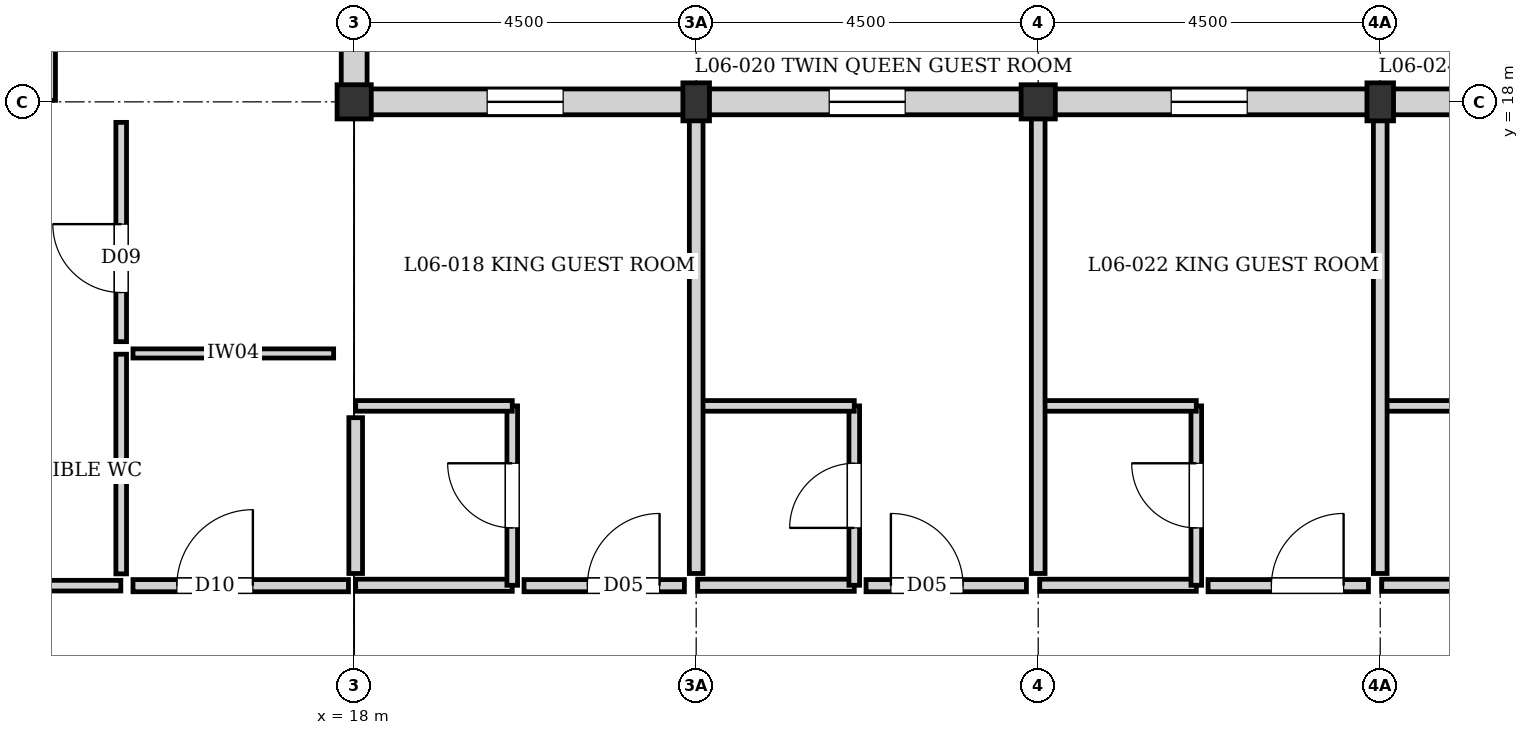
"""IFC4 building model, lengths in metres.
Left out: names, types, materials, properties, quantities, classifications, styles, units other than length and angle.
Written with IfcOpenShell. Run it as: python <this file> out.ifc"""

import sys

from ifc_helpers import new_model, si_unit, direction, frame, frame_2d, origin, origin_2d, place, context, subcontext, project, spatial, rectangle, extrude, element, fill, save


model = new_model("IFC4")
c1 = context("Model", 3, precision=1e-05, world=origin(), true_north=direction((0.0, 1.0)))
c2 = subcontext(c1, "Body", "Model", "MODEL_VIEW")
j1 = project(units=[si_unit("LENGTHUNIT", "METRE"), si_unit("PLANEANGLEUNIT", "RADIAN")], contexts=[c1])
p1 = place(None, origin())
s1 = spatial("IfcSite", under=j1, at=p1, CompositionType="ELEMENT")
p2 = place(p1, origin())
s2 = spatial("IfcBuilding", under=s1, at=p2, CompositionType="ELEMENT")
p3 = place(p2, frame((0.0, 0.0, 20.64)))
s3 = spatial("IfcBuildingStorey", under=s2, at=p3, CompositionType="ELEMENT", Elevation=20.64)
for number, where, z_axis, x_axis in (
    (1, (18.0, 18.0, 0.0), (0.0, 0.0, 1.0), (1.0, 0.0, 0.0)),
    (2, (27.0, 18.0, 0.0), (0.0, 0.0, 1.0), (1.0, 0.0, 0.0)),
):
    element("IfcColumn", number, at=place(p3, frame(where, z_axis=z_axis, x_axis=x_axis)), inside=s3, PredefinedType="COLUMN", context=c2, shape_type="SweptSolid", body=[
        extrude(rectangle(XDim=0.45, YDim=0.45, at=origin_2d()), origin(), (0.0, 0.0, 1.0), 3.04),
    ])
for number, where, z_axis, x_axis in (
    (3, (22.5, 18.0, 0.0), (0.0, 0.0, 1.0), (1.0, 0.0, 0.0)),
    (4, (31.5, 18.0, 0.0), (0.0, 0.0, 1.0), (1.0, 0.0, 0.0)),
):
    element("IfcColumn", number, at=place(p3, frame(where, z_axis=z_axis, x_axis=x_axis)), inside=s3, PredefinedType="PILASTER", context=c2, shape_type="SweptSolid", body=[
        extrude(rectangle(XDim=0.35, YDim=0.5, at=origin_2d()), origin(), (0.0, 0.0, 1.0), 3.04),
    ])
p4 = place(p3, frame((18.0, 27.0, 0.0), z_axis=(0.0, 0.0, 1.0), x_axis=(0.0, -1.0, 0.0)))
e5 = element("IfcWall", 5, at=p4, inside=s3, PredefinedType="SOLIDWALL", context=c2, shape_type="SweptSolid", body=[
    extrude(rectangle(XDim=8.845, YDim=0.34, at=frame_2d((4.422, 0.0))), origin(), (0.0, 0.0, 1.0), 2.38),
])
p5 = place(p4, frame((1.75, 0.0, 0.35)))
e6 = element("IfcOpeningElement", 6, at=p5, cuts=e5, PredefinedType="OPENING", context=c2, shape_type="SweptSolid", body=[
    extrude(rectangle(XDim=1.0, YDim=1.6, at=frame_2d((0.5, 0.8))), frame((0.0, 0.18, 0.0), z_axis=(0.0, -1.0, 0.0), x_axis=(1.0, 0.0, 0.0)), (0.0, 0.0, 1.0), 0.36),
])
p6 = place(p4, frame((6.25, 0.0, 0.35)))
e7 = element("IfcOpeningElement", 7, at=p6, cuts=e5, PredefinedType="OPENING", context=c2, shape_type="SweptSolid", body=[
    extrude(rectangle(XDim=1.0, YDim=1.6, at=frame_2d((0.5, 0.8))), frame((0.0, 0.18, 0.0), z_axis=(0.0, -1.0, 0.0), x_axis=(1.0, 0.0, 0.0)), (0.0, 0.0, 1.0), 0.36),
])
p7 = place(p3, frame((18.0, 18.0, 0.0), z_axis=(0.0, 0.0, 1.0), x_axis=(1.0, 0.0, 0.0)))
e8 = element("IfcWall", 8, at=p7, inside=s3, PredefinedType="SOLIDWALL", context=c2, shape_type="SweptSolid", body=[
    extrude(rectangle(XDim=9.0, YDim=0.34, at=frame_2d((4.5, 0.0))), origin(), (0.0, 0.0, 1.0), 2.42),
])
p8 = place(p7, frame((1.75, 0.0, 0.35)))
e9 = element("IfcOpeningElement", 9, at=p8, cuts=e8, PredefinedType="OPENING", context=c2, shape_type="SweptSolid", body=[
    extrude(rectangle(XDim=1.0, YDim=1.6, at=frame_2d((0.5, 0.8))), frame((0.0, 0.18, 0.0), z_axis=(0.0, -1.0, 0.0), x_axis=(1.0, 0.0, 0.0)), (0.0, 0.0, 1.0), 0.36),
])
p9 = place(p7, frame((6.25, 0.0, 0.35)))
e10 = element("IfcOpeningElement", 10, at=p9, cuts=e8, PredefinedType="OPENING", context=c2, shape_type="SweptSolid", body=[
    extrude(rectangle(XDim=1.0, YDim=1.6, at=frame_2d((0.5, 0.8))), frame((0.0, 0.18, 0.0), z_axis=(0.0, -1.0, 0.0), x_axis=(1.0, 0.0, 0.0)), (0.0, 0.0, 1.0), 0.36),
])
p10 = place(p3, frame((27.0, 18.0, 0.0), z_axis=(0.0, 0.0, 1.0), x_axis=(1.0, 0.0, 0.0)))
e11 = element("IfcWall", 11, at=p10, inside=s3, PredefinedType="SOLIDWALL", context=c2, shape_type="SweptSolid", body=[
    extrude(rectangle(XDim=9.0, YDim=0.34, at=frame_2d((4.5, 0.0))), origin(), (0.0, 0.0, 1.0), 2.38),
])
p11 = place(p10, frame((1.75, 0.0, 0.35)))
e12 = element("IfcOpeningElement", 12, at=p11, cuts=e11, PredefinedType="OPENING", context=c2, shape_type="SweptSolid", body=[
    extrude(rectangle(XDim=1.0, YDim=1.6, at=frame_2d((0.5, 0.8))), frame((0.0, 0.18, 0.0), z_axis=(0.0, -1.0, 0.0), x_axis=(1.0, 0.0, 0.0)), (0.0, 0.0, 1.0), 0.36),
])
p12 = place(p10, frame((6.25, 0.0, 0.35)))
e13 = element("IfcOpeningElement", 13, at=p12, cuts=e11, PredefinedType="OPENING", context=c2, shape_type="SweptSolid", body=[
    extrude(rectangle(XDim=1.0, YDim=1.6, at=frame_2d((0.5, 0.8))), frame((0.0, 0.18, 0.0), z_axis=(0.0, -1.0, 0.0), x_axis=(1.0, 0.0, 0.0)), (0.0, 0.0, 1.0), 0.36),
])
p13 = place(p3, frame((18.02, 11.64, 0.0), z_axis=(0.0, 0.0, 1.0), x_axis=(1.0, 0.0, 0.0)))
e14 = element("IfcWall", 14, at=p13, inside=s3, PredefinedType="PARTITIONING", context=c2, shape_type="SweptSolid", body=[
    extrude(rectangle(XDim=2.06, YDim=0.16, at=frame_2d((1.03, 0.0))), origin(), (0.0, 0.0, 1.0), 2.82),
])
p14 = place(p3, frame((20.08, 11.64, 0.0), z_axis=(0.0, 0.0, 1.0), x_axis=(0.0, 1.0, 0.0)))
e15 = element("IfcWall", 15, at=p14, inside=s3, PredefinedType="PLUMBINGWALL", context=c2, shape_type="SweptSolid", body=[
    extrude(rectangle(XDim=2.36, YDim=0.14, at=frame_2d((1.18, 0.0))), origin(), (0.0, 0.0, 1.0), 2.82),
])
p15 = place(p14, frame((0.755, 0.0, 0.0)))
e16 = element("IfcOpeningElement", 16, at=p15, cuts=e15, PredefinedType="OPENING", context=c2, shape_type="SweptSolid", body=[
    extrude(rectangle(XDim=0.85, YDim=2.04, at=frame_2d((0.425, 1.02))), frame((0.0, 0.08, 0.0), z_axis=(0.0, -1.0, 0.0), x_axis=(1.0, 0.0, 0.0)), (0.0, 0.0, 1.0), 0.16),
])
p16 = place(p3, frame((18.02, 14.0, 0.0), z_axis=(0.0, 0.0, 1.0), x_axis=(1.0, 0.0, 0.0)))
e17 = element("IfcWall", 17, at=p16, inside=s3, PredefinedType="PLUMBINGWALL", context=c2, shape_type="SweptSolid", body=[
    extrude(rectangle(XDim=2.06, YDim=0.14, at=frame_2d((1.03, 0.0))), origin(), (0.0, 0.0, 1.0), 2.82),
])
p17 = place(p3, frame((22.52, 11.64, 0.0), z_axis=(0.0, 0.0, 1.0), x_axis=(1.0, 0.0, 0.0)))
e18 = element("IfcWall", 18, at=p17, inside=s3, PredefinedType="PARTITIONING", context=c2, shape_type="SweptSolid", body=[
    extrude(rectangle(XDim=2.06, YDim=0.16, at=frame_2d((1.03, 0.0))), origin(), (0.0, 0.0, 1.0), 2.82),
])
p18 = place(p3, frame((24.58, 11.64, 0.0), z_axis=(0.0, 0.0, 1.0), x_axis=(0.0, 1.0, 0.0)))
e19 = element("IfcWall", 19, at=p18, inside=s3, PredefinedType="PLUMBINGWALL", context=c2, shape_type="SweptSolid", body=[
    extrude(rectangle(XDim=2.36, YDim=0.14, at=frame_2d((1.18, 0.0))), origin(), (0.0, 0.0, 1.0), 2.82),
])
p19 = place(p18, frame((0.755, 0.0, 0.0)))
e20 = element("IfcOpeningElement", 20, at=p19, cuts=e19, PredefinedType="OPENING", context=c2, shape_type="SweptSolid", body=[
    extrude(rectangle(XDim=0.85, YDim=2.04, at=frame_2d((0.425, 1.02))), frame((0.0, 0.08, 0.0), z_axis=(0.0, -1.0, 0.0), x_axis=(1.0, 0.0, 0.0)), (0.0, 0.0, 1.0), 0.16),
])
p20 = place(p3, frame((22.52, 14.0, 0.0), z_axis=(0.0, 0.0, 1.0), x_axis=(1.0, 0.0, 0.0)))
e21 = element("IfcWall", 21, at=p20, inside=s3, PredefinedType="PLUMBINGWALL", context=c2, shape_type="SweptSolid", body=[
    extrude(rectangle(XDim=2.06, YDim=0.14, at=frame_2d((1.03, 0.0))), origin(), (0.0, 0.0, 1.0), 2.82),
])
p21 = place(p3, frame((27.02, 11.64, 0.0), z_axis=(0.0, 0.0, 1.0), x_axis=(1.0, 0.0, 0.0)))
e22 = element("IfcWall", 22, at=p21, inside=s3, PredefinedType="PARTITIONING", context=c2, shape_type="SweptSolid", body=[
    extrude(rectangle(XDim=2.06, YDim=0.16, at=frame_2d((1.03, 0.0))), origin(), (0.0, 0.0, 1.0), 2.82),
])
p22 = place(p3, frame((29.08, 11.64, 0.0), z_axis=(0.0, 0.0, 1.0), x_axis=(0.0, 1.0, 0.0)))
e23 = element("IfcWall", 23, at=p22, inside=s3, PredefinedType="PLUMBINGWALL", context=c2, shape_type="SweptSolid", body=[
    extrude(rectangle(XDim=2.36, YDim=0.14, at=frame_2d((1.18, 0.0))), origin(), (0.0, 0.0, 1.0), 2.82),
])
p23 = place(p22, frame((0.755, 0.0, 0.0)))
e24 = element("IfcOpeningElement", 24, at=p23, cuts=e23, PredefinedType="OPENING", context=c2, shape_type="SweptSolid", body=[
    extrude(rectangle(XDim=0.85, YDim=2.04, at=frame_2d((0.425, 1.02))), frame((0.0, 0.08, 0.0), z_axis=(0.0, -1.0, 0.0), x_axis=(1.0, 0.0, 0.0)), (0.0, 0.0, 1.0), 0.16),
])
p24 = place(p3, frame((27.02, 14.0, 0.0), z_axis=(0.0, 0.0, 1.0), x_axis=(1.0, 0.0, 0.0)))
e25 = element("IfcWall", 25, at=p24, inside=s3, PredefinedType="PLUMBINGWALL", context=c2, shape_type="SweptSolid", body=[
    extrude(rectangle(XDim=2.06, YDim=0.14, at=frame_2d((1.03, 0.0))), origin(), (0.0, 0.0, 1.0), 2.82),
])
p25 = place(p3, frame((31.52, 11.64, 0.0), z_axis=(0.0, 0.0, 1.0), x_axis=(1.0, 0.0, 0.0)))
e26 = element("IfcWall", 26, at=p25, inside=s3, PredefinedType="PARTITIONING", context=c2, shape_type="SweptSolid", body=[
    extrude(rectangle(XDim=2.06, YDim=0.16, at=frame_2d((1.03, 0.0))), origin(), (0.0, 0.0, 1.0), 2.82),
])
for number, where, z_axis, x_axis in (
    (27, (31.52, 14.0, 0.0), (0.0, 0.0, 1.0), (1.0, 0.0, 0.0)),
    (28, (14.0, 18.02, 0.0), (0.0, 0.0, 1.0), (0.0, 1.0, 0.0)),
):
    element("IfcWall", number, at=place(p3, frame(where, z_axis=z_axis, x_axis=x_axis)), inside=s3, PredefinedType="PLUMBINGWALL", context=c2, shape_type="SweptSolid", body=[
        extrude(rectangle(XDim=2.06, YDim=0.14, at=frame_2d((1.03, 0.0))), origin(), (0.0, 0.0, 1.0), 2.82),
    ])
p26 = place(p3, frame((22.5, 11.795, 0.0), z_axis=(0.0, 0.0, 1.0), x_axis=(0.0, 1.0, 0.0)))
e29 = element("IfcWall", 29, at=p26, inside=s3, PredefinedType="PARTITIONING", context=c2, shape_type="SweptSolid", body=[
    extrude(rectangle(XDim=6.03, YDim=0.18, at=frame_2d((3.015, 0.0))), origin(), (0.0, 0.0, 1.0), 2.82),
])
p27 = place(p3, frame((27.0, 11.795, 0.0), z_axis=(0.0, 0.0, 1.0), x_axis=(0.0, 1.0, 0.0)))
e30 = element("IfcWall", 30, at=p27, inside=s3, PredefinedType="PARTITIONING", context=c2, shape_type="SweptSolid", body=[
    extrude(rectangle(XDim=6.03, YDim=0.18, at=frame_2d((3.015, 0.0))), origin(), (0.0, 0.0, 1.0), 2.19),
])
p28 = place(p3, frame((31.5, 11.795, 0.0), z_axis=(0.0, 0.0, 1.0), x_axis=(0.0, 1.0, 0.0)))
e31 = element("IfcWall", 31, at=p28, inside=s3, PredefinedType="PARTITIONING", context=c2, shape_type="SweptSolid", body=[
    extrude(rectangle(XDim=6.03, YDim=0.18, at=frame_2d((3.015, 0.0))), origin(), (0.0, 0.0, 1.0), 2.82),
])
p29 = place(p3, frame((18.02, 11.795, 0.0), z_axis=(0.0, 0.0, 1.0), x_axis=(0.0, 1.0, 0.0)))
e32 = element("IfcWall", 32, at=p29, inside=s3, PredefinedType="PARTITIONING", context=c2, shape_type="SweptSolid", body=[
    extrude(rectangle(XDim=2.05, YDim=0.18, at=frame_2d((1.025, 0.0))), origin(), (0.0, 0.0, 1.0), 2.42),
])
p30 = place(p3, frame((11.72, 11.635, 0.0), z_axis=(0.0, 0.0, 1.0), x_axis=(1.0, 0.0, 0.0)))
e33 = element("IfcWall", 33, at=p30, inside=s3, PredefinedType="PLUMBINGWALL", context=c2, shape_type="SweptSolid", body=[
    extrude(rectangle(XDim=3.21, YDim=0.14, at=frame_2d((1.605, 0.0))), origin(), (0.0, 0.0, 1.0), 2.82),
])
p31 = place(p3, frame((14.935, 11.79, 0.0), z_axis=(0.0, 0.0, 1.0), x_axis=(0.0, 1.0, 0.0)))
e34 = element("IfcWall", 34, at=p31, inside=s3, PredefinedType="PLUMBINGWALL", context=c2, shape_type="SweptSolid", body=[
    extrude(rectangle(XDim=2.89, YDim=0.14, at=frame_2d((1.445, 0.0))), origin(), (0.0, 0.0, 1.0), 2.82),
])
p32 = place(p3, frame((15.09, 14.69, 0.0), z_axis=(0.0, 0.0, 1.0), x_axis=(1.0, 0.0, 0.0)))
e35 = element("IfcWall", 35, at=p32, inside=s3, PredefinedType="PARTITIONING", context=c2, shape_type="SweptSolid", body=[
    extrude(rectangle(XDim=2.64, YDim=0.12, at=frame_2d((1.32, 0.0))), origin(), (0.0, 0.0, 1.0), 2.82),
])
p33 = place(p3, frame((15.09, 11.635, 0.0), z_axis=(0.0, 0.0, 1.0), x_axis=(1.0, 0.0, 0.0)))
e36 = element("IfcWall", 36, at=p33, inside=s3, PredefinedType="PARTITIONING", context=c2, shape_type="SweptSolid", body=[
    extrude(rectangle(XDim=2.835, YDim=0.16, at=frame_2d((1.417, 0.0))), origin(), (0.0, 0.0, 1.0), 2.82),
])
p34 = place(p33, frame((0.577, 0.0, 0.0)))
e37 = element("IfcOpeningElement", 37, at=p34, cuts=e36, PredefinedType="OPENING", context=c2, shape_type="SweptSolid", body=[
    extrude(rectangle(XDim=1.0, YDim=2.1, at=frame_2d((0.5, 1.05))), frame((0.0, 0.09, 0.0), z_axis=(0.0, -1.0, 0.0), x_axis=(1.0, 0.0, 0.0)), (0.0, 0.0, 1.0), 0.18),
])
p35 = place(p3, frame((20.235, 11.635, 0.0), z_axis=(0.0, 0.0, 1.0), x_axis=(1.0, 0.0, 0.0)))
e38 = element("IfcWall", 38, at=p35, inside=s3, PredefinedType="PARTITIONING", context=c2, shape_type="SweptSolid", body=[
    extrude(rectangle(XDim=2.11, YDim=0.16, at=frame_2d((1.055, 0.0))), origin(), (0.0, 0.0, 1.0), 2.82),
])
p36 = place(p35, frame((0.833, 0.0, 0.0)))
e39 = element("IfcOpeningElement", 39, at=p36, cuts=e38, PredefinedType="OPENING", context=c2, shape_type="SweptSolid", body=[
    extrude(rectangle(XDim=0.95, YDim=2.15, at=frame_2d((0.475, 1.075))), frame((0.0, 0.09, 0.0), z_axis=(0.0, -1.0, 0.0), x_axis=(1.0, 0.0, 0.0)), (0.0, 0.0, 1.0), 0.18),
])
p37 = place(p3, frame((24.735, 11.635, 0.0), z_axis=(0.0, 0.0, 1.0), x_axis=(1.0, 0.0, 0.0)))
e40 = element("IfcWall", 40, at=p37, inside=s3, PredefinedType="PARTITIONING", context=c2, shape_type="SweptSolid", body=[
    extrude(rectangle(XDim=2.11, YDim=0.16, at=frame_2d((1.055, 0.0))), origin(), (0.0, 0.0, 1.0), 2.82),
])
p38 = place(p37, frame((0.327, 0.0, 0.0)))
e41 = element("IfcOpeningElement", 41, at=p38, cuts=e40, PredefinedType="OPENING", context=c2, shape_type="SweptSolid", body=[
    extrude(rectangle(XDim=0.95, YDim=2.15, at=frame_2d((0.475, 1.075))), frame((0.0, 0.09, 0.0), z_axis=(0.0, -1.0, 0.0), x_axis=(1.0, 0.0, 0.0)), (0.0, 0.0, 1.0), 0.18),
])
p39 = place(p3, frame((29.235, 11.635, 0.0), z_axis=(0.0, 0.0, 1.0), x_axis=(1.0, 0.0, 0.0)))
e42 = element("IfcWall", 42, at=p39, inside=s3, PredefinedType="PARTITIONING", context=c2, shape_type="SweptSolid", body=[
    extrude(rectangle(XDim=2.11, YDim=0.16, at=frame_2d((1.055, 0.0))), origin(), (0.0, 0.0, 1.0), 2.82),
])
p40 = place(p39, frame((0.833, 0.0, 0.0)))
e43 = element("IfcOpeningElement", 43, at=p40, cuts=e42, PredefinedType="OPENING", context=c2, shape_type="SweptSolid", body=[
    extrude(rectangle(XDim=0.95, YDim=2.15, at=frame_2d((0.475, 1.075))), frame((0.0, 0.09, 0.0), z_axis=(0.0, -1.0, 0.0), x_axis=(1.0, 0.0, 0.0)), (0.0, 0.0, 1.0), 0.18),
])
p41 = place(p3, frame((14.935, 14.845, 0.0), z_axis=(0.0, 0.0, 1.0), x_axis=(0.0, 1.0, 0.0)))
e44 = element("IfcWall", 44, at=p41, inside=s3, PredefinedType="PLUMBINGWALL", context=c2, shape_type="SweptSolid", body=[
    extrude(rectangle(XDim=2.885, YDim=0.14, at=frame_2d((1.442, 0.0))), origin(), (0.0, 0.0, 1.0), 2.82),
])
p42 = place(p41, frame((0.646, 0.0, 0.0)))
e45 = element("IfcOpeningElement", 45, at=p42, cuts=e44, PredefinedType="OPENING", context=c2, shape_type="SweptSolid", body=[
    extrude(rectangle(XDim=0.9, YDim=2.1, at=frame_2d((0.45, 1.05))), frame((0.0, 0.08, 0.0), z_axis=(0.0, -1.0, 0.0), x_axis=(1.0, 0.0, 0.0)), (0.0, 0.0, 1.0), 0.16),
])
p43 = place(p8, origin())
e46 = element("IfcWindow", 46, at=p43, inside=s3, PartitioningType="SINGLE_PANEL", PredefinedType="WINDOW", context=c2, shape_type="SweptSolid", body=[
    extrude(rectangle(XDim=1.0, YDim=1.6, at=frame_2d((0.5, 0.8))), frame((0.0, 0.03, 0.0), z_axis=(0.0, -1.0, 0.0), x_axis=(1.0, 0.0, 0.0)), (0.0, 0.0, 1.0), 0.06),
])
fill(e9, e46)
p44 = place(p9, origin())
e47 = element("IfcWindow", 47, at=p44, inside=s3, PartitioningType="SINGLE_PANEL", PredefinedType="WINDOW", context=c2, shape_type="SweptSolid", body=[
    extrude(rectangle(XDim=1.0, YDim=1.6, at=frame_2d((0.5, 0.8))), frame((0.0, 0.03, 0.0), z_axis=(0.0, -1.0, 0.0), x_axis=(1.0, 0.0, 0.0)), (0.0, 0.0, 1.0), 0.06),
])
fill(e10, e47)
p45 = place(p11, origin())
e48 = element("IfcWindow", 48, at=p45, inside=s3, PartitioningType="SINGLE_PANEL", PredefinedType="WINDOW", context=c2, shape_type="SweptSolid", body=[
    extrude(rectangle(XDim=1.0, YDim=1.6, at=frame_2d((0.5, 0.8))), frame((0.0, 0.03, 0.0), z_axis=(0.0, -1.0, 0.0), x_axis=(1.0, 0.0, 0.0)), (0.0, 0.0, 1.0), 0.06),
])
fill(e12, e48)
p46 = place(p15, origin())
e49 = element("IfcDoor", 49, at=p46, inside=s3, OperationType="SINGLE_SWING_RIGHT", PredefinedType="DOOR", context=c2, shape_type="SweptSolid", body=[
    extrude(rectangle(XDim=0.85, YDim=2.04, at=frame_2d((0.425, 1.02))), frame((0.0, 0.025, 0.0), z_axis=(0.0, -1.0, 0.0), x_axis=(1.0, 0.0, 0.0)), (0.0, 0.0, 1.0), 0.05),
])
fill(e16, e49)
p47 = place(p19, origin())
e50 = element("IfcDoor", 50, at=p47, inside=s3, OperationType="SINGLE_SWING_LEFT", PredefinedType="DOOR", context=c2, shape_type="SweptSolid", body=[
    extrude(rectangle(XDim=0.85, YDim=2.04, at=frame_2d((0.425, 1.02))), frame((0.0, 0.025, 0.0), z_axis=(0.0, -1.0, 0.0), x_axis=(1.0, 0.0, 0.0)), (0.0, 0.0, 1.0), 0.05),
])
fill(e20, e50)
p48 = place(p23, origin())
e51 = element("IfcDoor", 51, at=p48, inside=s3, OperationType="SINGLE_SWING_RIGHT", PredefinedType="DOOR", context=c2, shape_type="SweptSolid", body=[
    extrude(rectangle(XDim=0.85, YDim=2.04, at=frame_2d((0.425, 1.02))), frame((0.0, 0.025, 0.0), z_axis=(0.0, -1.0, 0.0), x_axis=(1.0, 0.0, 0.0)), (0.0, 0.0, 1.0), 0.05),
])
fill(e24, e51)
p49 = place(p34, origin())
e52 = element("IfcDoor", 52, at=p49, inside=s3, OperationType="SINGLE_SWING_RIGHT", PredefinedType="DOOR", context=c2, shape_type="SweptSolid", body=[
    extrude(rectangle(XDim=1.0, YDim=2.1, at=frame_2d((0.5, 1.05))), frame((0.0, 0.025, 0.0), z_axis=(0.0, -1.0, 0.0), x_axis=(1.0, 0.0, 0.0)), (0.0, 0.0, 1.0), 0.05),
])
fill(e37, e52)
p50 = place(p36, origin())
e53 = element("IfcDoor", 53, at=p50, inside=s3, OperationType="SINGLE_SWING_RIGHT", PredefinedType="DOOR", context=c2, shape_type="SweptSolid", body=[
    extrude(rectangle(XDim=0.95, YDim=2.15, at=frame_2d((0.475, 1.075))), frame((0.0, 0.025, 0.0), z_axis=(0.0, -1.0, 0.0), x_axis=(1.0, 0.0, 0.0)), (0.0, 0.0, 1.0), 0.05),
])
fill(e39, e53)
p51 = place(p38, origin())
e54 = element("IfcDoor", 54, at=p51, inside=s3, OperationType="SINGLE_SWING_LEFT", PredefinedType="DOOR", context=c2, shape_type="SweptSolid", body=[
    extrude(rectangle(XDim=0.95, YDim=2.15, at=frame_2d((0.475, 1.075))), frame((0.0, 0.025, 0.0), z_axis=(0.0, -1.0, 0.0), x_axis=(1.0, 0.0, 0.0)), (0.0, 0.0, 1.0), 0.05),
])
fill(e41, e54)
p52 = place(p40, origin())
e55 = element("IfcDoor", 55, at=p52, inside=s3, OperationType="SINGLE_SWING_RIGHT", PredefinedType="DOOR", context=c2, shape_type="SweptSolid", body=[
    extrude(rectangle(XDim=0.95, YDim=2.15, at=frame_2d((0.475, 1.075))), frame((0.0, 0.025, 0.0), z_axis=(0.0, -1.0, 0.0), x_axis=(1.0, 0.0, 0.0)), (0.0, 0.0, 1.0), 0.05),
])
fill(e43, e55)
p53 = place(p42, origin())
e56 = element("IfcDoor", 56, at=p53, inside=s3, OperationType="SINGLE_SWING_RIGHT", PredefinedType="DOOR", context=c2, shape_type="SweptSolid", body=[
    extrude(rectangle(XDim=0.9, YDim=2.1, at=frame_2d((0.45, 1.05))), frame((0.0, 0.025, 0.0), z_axis=(0.0, -1.0, 0.0), x_axis=(1.0, 0.0, 0.0)), (0.0, 0.0, 1.0), 0.05),
])
fill(e45, e56)
save(model, sys.argv[1])
